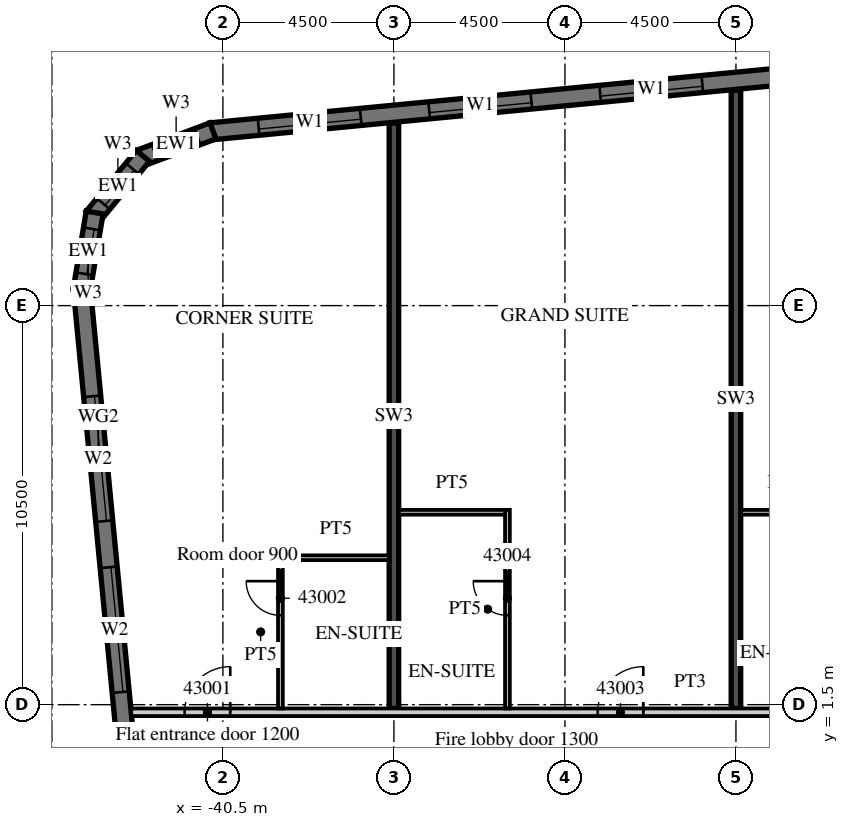
"""IFC4 building model, lengths in metres.
Left out: names, types, materials, properties, quantities, classifications, styles, units other than length and angle.
Written with IfcOpenShell. Run it as: python <this file> out.ifc"""

import sys

from ifc_helpers import new_model, si_unit, direction, frame, frame_2d, origin, place, context, subcontext, project, spatial, polyline, rectangle, outline, extrude, element, fill, save


model = new_model("IFC4")
c1 = context("Model", 3, precision=1e-05, world=origin(), true_north=direction((0.0, 1.0)))
c2 = subcontext(c1, "Body", "Model", "MODEL_VIEW")
j1 = project(units=[si_unit("LENGTHUNIT", "METRE"), si_unit("PLANEANGLEUNIT", "RADIAN")], contexts=[c1])
p1 = place(None, origin())
s1 = spatial("IfcSite", under=j1, at=p1, CompositionType="ELEMENT")
p2 = place(p1, origin())
s2 = spatial("IfcBuilding", under=s1, at=p2, CompositionType="ELEMENT")
p3 = place(p2, frame((0.0, 0.0, 183.4)))
s3 = spatial("IfcBuildingStorey", under=s2, at=p3, CompositionType="ELEMENT", Elevation=183.4)
p4 = place(p3, frame((-36.0, 1.4, 0.0), z_axis=(0.0, 0.0, 1.0), x_axis=(0.0, 1.0, 0.0)))
e1 = element("IfcWall", 1, at=p4, inside=s3, PredefinedType="SHEAR", context=c2, shape_type="SweptSolid", body=[
    extrude(rectangle(XDim=15.401, YDim=0.25, at=frame_2d((7.701, 0.0))), origin(), (0.0, 0.0, 1.0), 3.3),
])
p5 = place(p3, frame((-27.0, 1.4, 0.0), z_axis=(0.0, 0.0, 1.0), x_axis=(0.0, 1.0, 0.0)))
e2 = element("IfcWall", 2, at=p5, inside=s3, PredefinedType="SHEAR", context=c2, shape_type="SweptSolid", body=[
    extrude(rectangle(XDim=16.268, YDim=0.25, at=frame_2d((8.134, 0.0))), origin(), (0.0, 0.0, 1.0), 3.3),
])
p6 = place(p3, frame((-44.214, 12.466, 0.0), z_axis=(0.0, 0.0, 1.0), x_axis=(0.095847314626, -0.995396047952, 0.0)))
e3 = element("IfcWall", 3, at=p6, inside=s3, PredefinedType="SOLIDWALL", context=c2, shape_type="SweptSolid", body=[
    extrude(rectangle(XDim=34.0, YDim=0.45, at=frame_2d((17.0, 0.0))), origin(), (0.0, 0.0, 1.0), 3.02),
])
p7 = place(p6, frame((2.865, 0.0, 0.45)))
e4 = element("IfcOpeningElement", 4, at=p7, cuts=e3, PredefinedType="OPENING", context=c2, shape_type="SweptSolid", body=[
    extrude(rectangle(XDim=3.3, YDim=2.25, at=frame_2d((1.65, 1.125))), frame((0.0, 0.235, 0.0), z_axis=(0.0, -1.0, 0.0), x_axis=(1.0, 0.0, 0.0)), (0.0, 0.0, 1.0), 0.47),
])
p8 = place(p6, frame((7.386, 0.0, 0.45)))
e5 = element("IfcOpeningElement", 5, at=p8, cuts=e3, PredefinedType="OPENING", context=c2, shape_type="SweptSolid", body=[
    extrude(rectangle(XDim=3.3, YDim=2.25, at=frame_2d((1.65, 1.125))), frame((0.0, 0.235, 0.0), z_axis=(0.0, -1.0, 0.0), x_axis=(1.0, 0.0, 0.0)), (0.0, 0.0, 1.0), 0.47),
])
p9 = place(p3, frame((13.521, 21.817, 0.0), z_axis=(0.0, 0.0, 1.0), x_axis=(-0.995396508751, -0.095842529008, 0.0)))
e6 = element("IfcWall", 6, at=p9, inside=s3, PredefinedType="SOLIDWALL", context=c2, shape_type="SweptSolid", body=[
    extrude(rectangle(XDim=54.591, YDim=0.45, at=frame_2d((27.296, 0.0))), origin(), (0.0, 0.0, 1.0), 3.02),
])
p10 = place(p9, frame((0.91, 0.0, 0.45)))
e7 = element("IfcOpeningElement", 7, at=p10, cuts=e6, PredefinedType="OPENING", context=c2, shape_type="SweptSolid", body=[
    extrude(rectangle(XDim=2.7, YDim=2.25, at=frame_2d((1.35, 1.125))), frame((0.0, 0.235, 0.0), z_axis=(0.0, -1.0, 0.0), x_axis=(1.0, 0.0, 0.0)), (0.0, 0.0, 1.0), 0.47),
])
p11 = place(p9, frame((5.431, 0.0, 0.45)))
e8 = element("IfcOpeningElement", 8, at=p11, cuts=e6, PredefinedType="OPENING", context=c2, shape_type="SweptSolid", body=[
    extrude(rectangle(XDim=2.7, YDim=2.25, at=frame_2d((1.35, 1.125))), frame((0.0, 0.235, 0.0), z_axis=(0.0, -1.0, 0.0), x_axis=(1.0, 0.0, 0.0)), (0.0, 0.0, 1.0), 0.47),
])
p12 = place(p9, frame((9.952, 0.0, 0.45)))
e9 = element("IfcOpeningElement", 9, at=p12, cuts=e6, PredefinedType="OPENING", context=c2, shape_type="SweptSolid", body=[
    extrude(rectangle(XDim=2.7, YDim=2.25, at=frame_2d((1.35, 1.125))), frame((0.0, 0.235, 0.0), z_axis=(0.0, -1.0, 0.0), x_axis=(1.0, 0.0, 0.0)), (0.0, 0.0, 1.0), 0.47),
])
p13 = place(p9, frame((14.473, 0.0, 0.45)))
e10 = element("IfcOpeningElement", 10, at=p13, cuts=e6, PredefinedType="OPENING", context=c2, shape_type="SweptSolid", body=[
    extrude(rectangle(XDim=2.7, YDim=2.25, at=frame_2d((1.35, 1.125))), frame((0.0, 0.235, 0.0), z_axis=(0.0, -1.0, 0.0), x_axis=(1.0, 0.0, 0.0)), (0.0, 0.0, 1.0), 0.47),
])
p14 = place(p9, frame((18.994, 0.0, 0.45)))
e11 = element("IfcOpeningElement", 11, at=p14, cuts=e6, PredefinedType="OPENING", context=c2, shape_type="SweptSolid", body=[
    extrude(rectangle(XDim=2.7, YDim=2.25, at=frame_2d((1.35, 1.125))), frame((0.0, 0.235, 0.0), z_axis=(0.0, -1.0, 0.0), x_axis=(1.0, 0.0, 0.0)), (0.0, 0.0, 1.0), 0.47),
])
p15 = place(p9, frame((23.514, 0.0, 0.45)))
e12 = element("IfcOpeningElement", 12, at=p15, cuts=e6, PredefinedType="OPENING", context=c2, shape_type="SweptSolid", body=[
    extrude(rectangle(XDim=2.7, YDim=2.25, at=frame_2d((1.35, 1.125))), frame((0.0, 0.235, 0.0), z_axis=(0.0, -1.0, 0.0), x_axis=(1.0, 0.0, 0.0)), (0.0, 0.0, 1.0), 0.47),
])
p16 = place(p9, frame((28.035, 0.0, 0.45)))
e13 = element("IfcOpeningElement", 13, at=p16, cuts=e6, PredefinedType="OPENING", context=c2, shape_type="SweptSolid", body=[
    extrude(rectangle(XDim=2.7, YDim=2.25, at=frame_2d((1.35, 1.125))), frame((0.0, 0.235, 0.0), z_axis=(0.0, -1.0, 0.0), x_axis=(1.0, 0.0, 0.0)), (0.0, 0.0, 1.0), 0.47),
])
p17 = place(p9, frame((32.556, 0.0, 0.45)))
e14 = element("IfcOpeningElement", 14, at=p17, cuts=e6, PredefinedType="OPENING", context=c2, shape_type="SweptSolid", body=[
    extrude(rectangle(XDim=2.7, YDim=2.25, at=frame_2d((1.35, 1.125))), frame((0.0, 0.235, 0.0), z_axis=(0.0, -1.0, 0.0), x_axis=(1.0, 0.0, 0.0)), (0.0, 0.0, 1.0), 0.47),
])
p18 = place(p9, frame((37.077, 0.0, 0.45)))
e15 = element("IfcOpeningElement", 15, at=p18, cuts=e6, PredefinedType="OPENING", context=c2, shape_type="SweptSolid", body=[
    extrude(rectangle(XDim=2.7, YDim=2.25, at=frame_2d((1.35, 1.125))), frame((0.0, 0.235, 0.0), z_axis=(0.0, -1.0, 0.0), x_axis=(1.0, 0.0, 0.0)), (0.0, 0.0, 1.0), 0.47),
])
p19 = place(p9, frame((41.598, 0.0, 0.45)))
e16 = element("IfcOpeningElement", 16, at=p19, cuts=e6, PredefinedType="OPENING", context=c2, shape_type="SweptSolid", body=[
    extrude(rectangle(XDim=2.7, YDim=2.25, at=frame_2d((1.35, 1.125))), frame((0.0, 0.235, 0.0), z_axis=(0.0, -1.0, 0.0), x_axis=(1.0, 0.0, 0.0)), (0.0, 0.0, 1.0), 0.47),
])
p20 = place(p9, frame((46.118, 0.0, 0.45)))
e17 = element("IfcOpeningElement", 17, at=p20, cuts=e6, PredefinedType="OPENING", context=c2, shape_type="SweptSolid", body=[
    extrude(rectangle(XDim=2.7, YDim=2.25, at=frame_2d((1.35, 1.125))), frame((0.0, 0.235, 0.0), z_axis=(0.0, -1.0, 0.0), x_axis=(1.0, 0.0, 0.0)), (0.0, 0.0, 1.0), 0.47),
])
p21 = place(p9, frame((50.629, 0.0, 0.45)))
e18 = element("IfcOpeningElement", 18, at=p21, cuts=e6, PredefinedType="OPENING", context=c2, shape_type="SweptSolid", body=[
    extrude(rectangle(XDim=2.7, YDim=2.25, at=frame_2d((1.35, 1.125))), frame((0.0, 0.235, 0.0), z_axis=(0.0, -1.0, 0.0), x_axis=(1.0, 0.0, 0.0)), (0.0, 0.0, 1.0), 0.47),
])
p22 = place(p3, frame((-40.761, 16.598, 0.0), z_axis=(0.0, 0.0, 1.0), x_axis=(-0.936677599948, -0.350192909346, 0.0)))
e19 = element("IfcWall", 19, at=p22, inside=s3, PredefinedType="SOLIDWALL", context=c2, shape_type="SweptSolid", body=[
    extrude(outline(polyline([(0.0, -0.225), (2.071, -0.225), (1.95, 0.225), (0.121, 0.225), (0.0, -0.225)])), origin(), (0.0, 0.0, 1.0), 3.02),
])
p23 = place(p22, frame((0.435, 0.0, 0.45)))
e20 = element("IfcOpeningElement", 20, at=p23, cuts=e19, PredefinedType="OPENING", context=c2, shape_type="SweptSolid", body=[
    extrude(rectangle(XDim=1.2, YDim=2.25, at=frame_2d((0.6, 1.125))), frame((0.0, 0.235, 0.0), z_axis=(0.0, -1.0, 0.0), x_axis=(1.0, 0.0, 0.0)), (0.0, 0.0, 1.0), 0.47),
])
p24 = place(p3, frame((-42.606, 15.941, 0.0), z_axis=(0.0, 0.0, 1.0), x_axis=(-0.636116318187, -0.771593176315, 0.0)))
e21 = element("IfcWall", 21, at=p24, inside=s3, PredefinedType="SOLIDWALL", context=c2, shape_type="SweptSolid", body=[
    extrude(outline(polyline([(0.0, -0.225), (2.071, -0.225), (1.95, 0.225), (0.121, 0.225), (0.0, -0.225)])), origin(), (0.0, 0.0, 1.0), 3.02),
])
p25 = place(p24, frame((0.435, 0.0, 0.45)))
e22 = element("IfcOpeningElement", 22, at=p25, cuts=e21, PredefinedType="OPENING", context=c2, shape_type="SweptSolid", body=[
    extrude(rectangle(XDim=1.2, YDim=2.25, at=frame_2d((0.6, 1.125))), frame((0.0, 0.235, 0.0), z_axis=(0.0, -1.0, 0.0), x_axis=(1.0, 0.0, 0.0)), (0.0, 0.0, 1.0), 0.47),
])
p26 = place(p3, frame((-43.875, 14.449, 0.0), z_axis=(0.0, 0.0, 1.0), x_axis=(-0.164953448126, -0.986301353518, 0.0)))
e23 = element("IfcWall", 23, at=p26, inside=s3, PredefinedType="SOLIDWALL", context=c2, shape_type="SweptSolid", body=[
    extrude(outline(polyline([(0.0, -0.225), (2.071, -0.225), (1.95, 0.225), (0.121, 0.225), (0.0, -0.225)])), origin(), (0.0, 0.0, 1.0), 3.02),
])
p27 = place(p26, frame((0.435, 0.0, 0.45)))
e24 = element("IfcOpeningElement", 24, at=p27, cuts=e23, PredefinedType="OPENING", context=c2, shape_type="SweptSolid", body=[
    extrude(rectangle(XDim=1.2, YDim=2.25, at=frame_2d((0.6, 1.125))), frame((0.0, 0.235, 0.0), z_axis=(0.0, -1.0, 0.0), x_axis=(1.0, 0.0, 0.0)), (0.0, 0.0, 1.0), 0.47),
])
p28 = place(p3, frame((-42.913, 1.3, 0.0), z_axis=(0.0, 0.0, 1.0), x_axis=(1.0, 0.0, 0.0)))
e25 = element("IfcWall", 25, at=p28, inside=s3, PredefinedType="PARTITIONING", context=c2, shape_type="SweptSolid", body=[
    extrude(rectangle(XDim=29.413, YDim=0.2, at=frame_2d((14.707, 0.0))), origin(), (0.0, 0.0, 1.0), 3.02),
])
p29 = place(p28, frame((1.406, 0.0, 0.0)))
e26 = element("IfcOpeningElement", 26, at=p29, cuts=e25, PredefinedType="OPENING", context=c2, shape_type="SweptSolid", body=[
    extrude(rectangle(XDim=1.2, YDim=2.1, at=frame_2d((0.6, 1.05))), frame((0.0, 0.11, 0.0), z_axis=(0.0, -1.0, 0.0), x_axis=(1.0, 0.0, 0.0)), (0.0, 0.0, 1.0), 0.22),
])
p30 = place(p28, frame((12.275, 0.0, 0.0)))
e27 = element("IfcOpeningElement", 27, at=p30, cuts=e25, PredefinedType="OPENING", context=c2, shape_type="SweptSolid", body=[
    extrude(rectangle(XDim=1.2, YDim=2.1, at=frame_2d((0.6, 1.05))), frame((0.0, 0.11, 0.0), z_axis=(0.0, -1.0, 0.0), x_axis=(1.0, 0.0, 0.0)), (0.0, 0.0, 1.0), 0.22),
])
p31 = place(p28, frame((18.863, 0.0, 0.0)))
e28 = element("IfcOpeningElement", 28, at=p31, cuts=e25, PredefinedType="OPENING", context=c2, shape_type="SweptSolid", body=[
    extrude(rectangle(XDim=1.0, YDim=2.1, at=frame_2d((0.5, 1.05))), frame((0.0, 0.11, 0.0), z_axis=(0.0, -1.0, 0.0), x_axis=(1.0, 0.0, 0.0)), (0.0, 0.0, 1.0), 0.22),
])
p32 = place(p28, frame((23.338, 0.0, 0.0)))
e29 = element("IfcOpeningElement", 29, at=p32, cuts=e25, PredefinedType="OPENING", context=c2, shape_type="SweptSolid", body=[
    extrude(rectangle(XDim=1.0, YDim=2.1, at=frame_2d((0.5, 1.05))), frame((0.0, 0.11, 0.0), z_axis=(0.0, -1.0, 0.0), x_axis=(1.0, 0.0, 0.0)), (0.0, 0.0, 1.0), 0.22),
])
p33 = place(p28, frame((27.838, 0.0, 0.0)))
e30 = element("IfcOpeningElement", 30, at=p33, cuts=e25, PredefinedType="OPENING", context=c2, shape_type="SweptSolid", body=[
    extrude(rectangle(XDim=1.0, YDim=2.1, at=frame_2d((0.5, 1.05))), frame((0.0, 0.11, 0.0), z_axis=(0.0, -1.0, 0.0), x_axis=(1.0, 0.0, 0.0)), (0.0, 0.0, 1.0), 0.22),
])
p34 = place(p3, frame((-38.987, 1.4, 0.0), z_axis=(0.0, 0.0, 1.0), x_axis=(0.0, 1.0, 0.0)))
e31 = element("IfcWall", 31, at=p34, inside=s3, PredefinedType="PARTITIONING", context=c2, shape_type="SweptSolid", body=[
    extrude(rectangle(XDim=4.028, YDim=0.125, at=frame_2d((2.014, 0.0))), origin(), (0.0, 0.0, 1.0), 3.02),
])
p35 = place(p34, frame((2.45, 0.0, 0.0)))
e32 = element("IfcOpeningElement", 32, at=p35, cuts=e31, PredefinedType="OPENING", context=c2, shape_type="SweptSolid", body=[
    extrude(rectangle(XDim=0.9, YDim=2.1, at=frame_2d((0.45, 1.05))), frame((0.0, 0.073, 0.0), z_axis=(0.0, -1.0, 0.0), x_axis=(1.0, 0.0, 0.0)), (0.0, 0.0, 1.0), 0.145),
])
p36 = place(p3, frame((-38.925, 5.366, 0.0), z_axis=(0.0, 0.0, 1.0), x_axis=(1.0, 0.0, 0.0)))
e33 = element("IfcWall", 33, at=p36, inside=s3, PredefinedType="PARTITIONING", context=c2, shape_type="SweptSolid", body=[
    extrude(rectangle(XDim=2.8, YDim=0.125, at=frame_2d((1.4, 0.0))), origin(), (0.0, 0.0, 1.0), 3.02),
])
p37 = place(p3, frame((-33.013, 1.4, 0.0), z_axis=(0.0, 0.0, 1.0), x_axis=(0.0, 1.0, 0.0)))
e34 = element("IfcWall", 34, at=p37, inside=s3, PredefinedType="PARTITIONING", context=c2, shape_type="SweptSolid", body=[
    extrude(rectangle(XDim=5.225, YDim=0.125, at=frame_2d((2.613, 0.0))), origin(), (0.0, 0.0, 1.0), 3.02),
])
p38 = place(p37, frame((2.45, 0.0, 0.0)))
e35 = element("IfcOpeningElement", 35, at=p38, cuts=e34, PredefinedType="OPENING", context=c2, shape_type="SweptSolid", body=[
    extrude(rectangle(XDim=0.9, YDim=2.1, at=frame_2d((0.45, 1.05))), frame((0.0, 0.073, 0.0), z_axis=(0.0, -1.0, 0.0), x_axis=(1.0, 0.0, 0.0)), (0.0, 0.0, 1.0), 0.145),
])
p39 = place(p3, frame((-35.875, 6.562, 0.0), z_axis=(0.0, 0.0, 1.0), x_axis=(1.0, 0.0, 0.0)))
e36 = element("IfcWall", 36, at=p39, inside=s3, PredefinedType="PARTITIONING", context=c2, shape_type="SweptSolid", body=[
    extrude(rectangle(XDim=2.8, YDim=0.125, at=frame_2d((1.4, 0.0))), origin(), (0.0, 0.0, 1.0), 3.02),
])
p40 = place(p3, frame((-26.875, 6.562, 0.0), z_axis=(0.0, 0.0, 1.0), x_axis=(1.0, 0.0, 0.0)))
e37 = element("IfcWall", 37, at=p40, inside=s3, PredefinedType="PARTITIONING", context=c2, shape_type="SweptSolid", body=[
    extrude(rectangle(XDim=2.25, YDim=0.125, at=frame_2d((1.125, 0.0))), origin(), (0.0, 0.0, 1.0), 3.02),
])
p41 = place(p7, origin())
e38 = element("IfcWindow", 38, at=p41, inside=s3, PartitioningType="SINGLE_PANEL", PredefinedType="WINDOW", context=c2, shape_type="SweptSolid", body=[
    extrude(rectangle(XDim=3.3, YDim=2.25, at=frame_2d((1.65, 1.125))), frame((0.0, 0.09, 0.0), z_axis=(0.0, -1.0, 0.0), x_axis=(1.0, 0.0, 0.0)), (0.0, 0.0, 1.0), 0.06),
])
fill(e4, e38)
p42 = place(p8, origin())
e39 = element("IfcWindow", 39, at=p42, inside=s3, PartitioningType="SINGLE_PANEL", PredefinedType="WINDOW", context=c2, shape_type="SweptSolid", body=[
    extrude(rectangle(XDim=3.3, YDim=2.25, at=frame_2d((1.65, 1.125))), frame((0.0, 0.09, 0.0), z_axis=(0.0, -1.0, 0.0), x_axis=(1.0, 0.0, 0.0)), (0.0, 0.0, 1.0), 0.06),
])
fill(e5, e39)
p43 = place(p19, origin())
e40 = element("IfcWindow", 40, at=p43, inside=s3, PartitioningType="SINGLE_PANEL", PredefinedType="WINDOW", context=c2, shape_type="SweptSolid", body=[
    extrude(rectangle(XDim=2.7, YDim=2.25, at=frame_2d((1.35, 1.125))), frame((0.0, 0.09, 0.0), z_axis=(0.0, -1.0, 0.0), x_axis=(1.0, 0.0, 0.0)), (0.0, 0.0, 1.0), 0.06),
])
fill(e16, e40)
p44 = place(p20, origin())
e41 = element("IfcWindow", 41, at=p44, inside=s3, PartitioningType="SINGLE_PANEL", PredefinedType="WINDOW", context=c2, shape_type="SweptSolid", body=[
    extrude(rectangle(XDim=2.7, YDim=2.25, at=frame_2d((1.35, 1.125))), frame((0.0, 0.09, 0.0), z_axis=(0.0, -1.0, 0.0), x_axis=(1.0, 0.0, 0.0)), (0.0, 0.0, 1.0), 0.06),
])
fill(e17, e41)
p45 = place(p21, origin())
e42 = element("IfcWindow", 42, at=p45, inside=s3, PartitioningType="SINGLE_PANEL", PredefinedType="WINDOW", context=c2, shape_type="SweptSolid", body=[
    extrude(rectangle(XDim=2.7, YDim=2.25, at=frame_2d((1.35, 1.125))), frame((0.0, 0.09, 0.0), z_axis=(0.0, -1.0, 0.0), x_axis=(1.0, 0.0, 0.0)), (0.0, 0.0, 1.0), 0.06),
])
fill(e18, e42)
p46 = place(p23, origin())
e43 = element("IfcWindow", 43, at=p46, inside=s3, PartitioningType="SINGLE_PANEL", PredefinedType="WINDOW", context=c2, shape_type="SweptSolid", body=[
    extrude(rectangle(XDim=1.2, YDim=2.25, at=frame_2d((0.6, 1.125))), frame((0.0, 0.09, 0.0), z_axis=(0.0, -1.0, 0.0), x_axis=(1.0, 0.0, 0.0)), (0.0, 0.0, 1.0), 0.06),
])
fill(e20, e43)
p47 = place(p25, origin())
e44 = element("IfcWindow", 44, at=p47, inside=s3, PartitioningType="SINGLE_PANEL", PredefinedType="WINDOW", context=c2, shape_type="SweptSolid", body=[
    extrude(rectangle(XDim=1.2, YDim=2.25, at=frame_2d((0.6, 1.125))), frame((0.0, 0.09, 0.0), z_axis=(0.0, -1.0, 0.0), x_axis=(1.0, 0.0, 0.0)), (0.0, 0.0, 1.0), 0.06),
])
fill(e22, e44)
p48 = place(p27, origin())
e45 = element("IfcWindow", 45, at=p48, inside=s3, PartitioningType="SINGLE_PANEL", PredefinedType="WINDOW", context=c2, shape_type="SweptSolid", body=[
    extrude(rectangle(XDim=1.2, YDim=2.25, at=frame_2d((0.6, 1.125))), frame((0.0, 0.09, 0.0), z_axis=(0.0, -1.0, 0.0), x_axis=(1.0, 0.0, 0.0)), (0.0, 0.0, 1.0), 0.06),
])
fill(e24, e45)
p49 = place(p29, origin())
e46 = element("IfcDoor", 46, at=p49, inside=s3, OperationType="SINGLE_SWING_RIGHT", PredefinedType="DOOR", context=c2, shape_type="SweptSolid", body=[
    extrude(rectangle(XDim=1.2, YDim=2.1, at=frame_2d((0.6, 1.05))), frame((0.0, 0.025, 0.0), z_axis=(0.0, -1.0, 0.0), x_axis=(1.0, 0.0, 0.0)), (0.0, 0.0, 1.0), 0.05),
])
fill(e26, e46)
p50 = place(p35, origin())
e47 = element("IfcDoor", 47, at=p50, inside=s3, OperationType="SINGLE_SWING_RIGHT", PredefinedType="DOOR", context=c2, shape_type="SweptSolid", body=[
    extrude(rectangle(XDim=0.9, YDim=2.1, at=frame_2d((0.45, 1.05))), frame((0.0, 0.025, 0.0), z_axis=(0.0, -1.0, 0.0), x_axis=(1.0, 0.0, 0.0)), (0.0, 0.0, 1.0), 0.05),
])
fill(e32, e47)
p51 = place(p30, origin())
e48 = element("IfcDoor", 48, at=p51, inside=s3, OperationType="SINGLE_SWING_RIGHT", PredefinedType="DOOR", context=c2, shape_type="SweptSolid", body=[
    extrude(rectangle(XDim=1.2, YDim=2.1, at=frame_2d((0.6, 1.05))), frame((0.0, 0.025, 0.0), z_axis=(0.0, -1.0, 0.0), x_axis=(1.0, 0.0, 0.0)), (0.0, 0.0, 1.0), 0.05),
])
fill(e27, e48)
p52 = place(p38, origin())
e49 = element("IfcDoor", 49, at=p52, inside=s3, OperationType="SINGLE_SWING_RIGHT", PredefinedType="DOOR", context=c2, shape_type="SweptSolid", body=[
    extrude(rectangle(XDim=0.9, YDim=2.1, at=frame_2d((0.45, 1.05))), frame((0.0, 0.025, 0.0), z_axis=(0.0, -1.0, 0.0), x_axis=(1.0, 0.0, 0.0)), (0.0, 0.0, 1.0), 0.05),
])
fill(e35, e49)
save(model, sys.argv[1])
